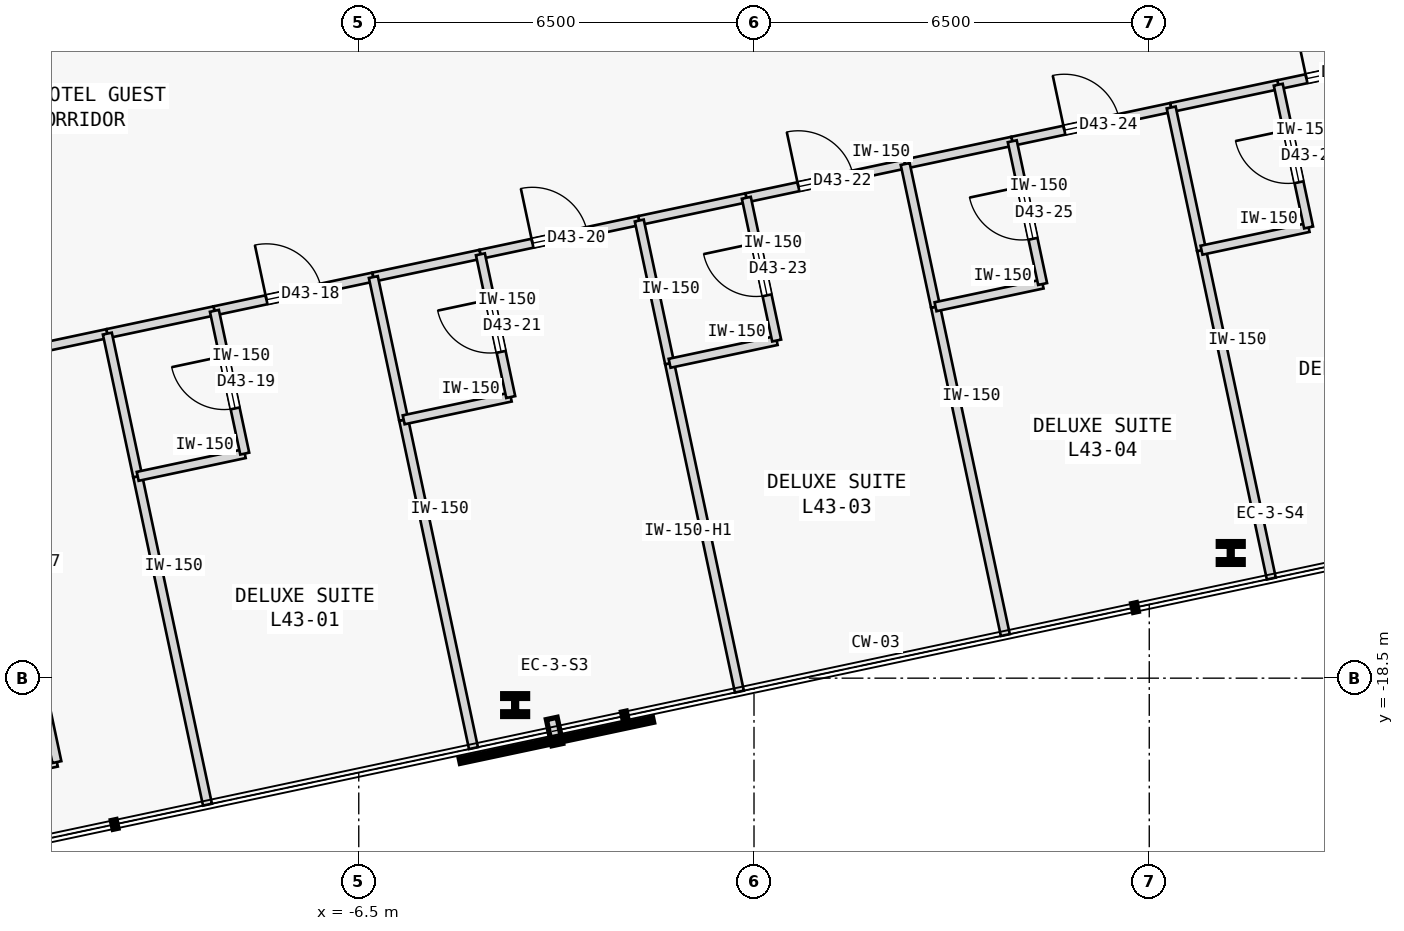
"""IFC4 building model, lengths in metres.
Left out: names, types, materials, properties, quantities, classifications, styles, units other than length and angle.
Written with IfcOpenShell. Run it as: python <this file> out.ifc"""

import sys

from ifc_helpers import new_model, si_unit, direction, frame, frame_2d, origin, origin_2d, place, context, subcontext, project, spatial, rectangle, i_section, extrude, element, fill, save


model = new_model("IFC4")
c1 = context("Model", 3, precision=1e-05, world=origin(), true_north=direction((0.0, 1.0)))
c2 = subcontext(c1, "Body", "Model", "MODEL_VIEW")
j1 = project(units=[si_unit("LENGTHUNIT", "METRE"), si_unit("PLANEANGLEUNIT", "RADIAN")], contexts=[c1])
p1 = place(None, origin())
s1 = spatial("IfcSite", under=j1, at=p1, CompositionType="ELEMENT")
p2 = place(p1, origin())
s2 = spatial("IfcBuilding", under=s1, at=p2, CompositionType="ELEMENT")
p3 = place(p2, frame((0.0, 0.0, 168.4)))
s3 = spatial("IfcBuildingStorey", under=s2, at=p3, CompositionType="ELEMENT", Elevation=168.4)
for number, where, z_axis, x_axis in (
    (1, (-3.928, -18.943, 0.0), (0.0, 0.0, 1.0), (1.0, 0.0, 0.0)),
    (2, (7.84, -16.441, 0.0), (0.0, 0.0, 1.0), (1.0, 0.0, 0.0)),
):
    element("IfcColumn", number, at=place(p3, frame(where, z_axis=z_axis, x_axis=x_axis)), inside=s3, PredefinedType="COLUMN", context=c2, shape_type="SweptSolid", body=[
        extrude(i_section(OverallWidth=0.409, OverallDepth=0.374, WebThickness=0.048, FlangeThickness=0.077, FilletRadius=0.015, at=origin_2d()), origin(), (0.0, 0.0, 1.0), 3.4),
    ])
p4 = place(p3, frame((-13.274, -20.265, 0.0), z_axis=(0.0, 0.0, 1.0), x_axis=(0.978160192495, 0.207852442415, 0.0)))
e3 = element("IfcWall", 3, at=p4, inside=s3, PredefinedType="PARTITIONING", context=c2, shape_type="SweptSolid", body=[
    extrude(rectangle(XDim=1.85, YDim=0.15, at=frame_2d((0.925, 0.0))), origin(), (0.0, 0.0, 1.0), 3.175),
])
p5 = place(p3, frame((-11.465, -19.88, 0.0), z_axis=(0.0, 0.0, 1.0), x_axis=(-0.207916109912, 0.978146661416, 0.0)))
e4 = element("IfcWall", 4, at=p5, inside=s3, PredefinedType="PARTITIONING", context=c2, shape_type="SweptSolid", body=[
    extrude(rectangle(XDim=6.72, YDim=0.15, at=frame_2d((3.36, 0.0))), origin(), (0.0, 0.0, 1.0), 3.175),
])
p6 = place(p5, frame((2.9, 0.0, 0.0)))
e5 = element("IfcOpeningElement", 5, at=p6, cuts=e4, PredefinedType="OPENING", context=c2, shape_type="SweptSolid", body=[
    extrude(rectangle(XDim=0.92, YDim=2.15, at=frame_2d((0.46, 1.075))), frame((0.0, 0.085, 0.0), z_axis=(0.0, -1.0, 0.0), x_axis=(1.0, 0.0, 0.0)), (0.0, 0.0, 1.0), 0.17),
])
p7 = place(p3, frame((-12.862, -13.307, 0.0), z_axis=(0.0, 0.0, 1.0), x_axis=(0.978150947903, 0.207895943, 0.0)))
e6 = element("IfcWall", 6, at=p7, inside=s3, PredefinedType="PARTITIONING", context=c2, shape_type="SweptSolid", body=[
    extrude(rectangle(XDim=2.277, YDim=0.15, at=frame_2d((1.139, 0.0))), origin(), (0.0, 0.0, 1.0), 3.175),
])
p8 = place(p3, frame((-8.874, -12.459, 0.0), z_axis=(0.0, 0.0, 1.0), x_axis=(0.978136784457, 0.207962570894, 0.0)))
e7 = element("IfcWall", 7, at=p8, inside=s3, PredefinedType="PARTITIONING", context=c2, shape_type="SweptSolid", body=[
    extrude(rectangle(XDim=2.672, YDim=0.15, at=frame_2d((1.336, 0.0))), origin(), (0.0, 0.0, 1.0), 3.175),
])
p9 = place(p8, frame((0.876, 0.0, 0.0)))
e8 = element("IfcOpeningElement", 8, at=p9, cuts=e7, PredefinedType="OPENING", context=c2, shape_type="SweptSolid", body=[
    extrude(rectangle(XDim=0.92, YDim=2.15, at=frame_2d((0.46, 1.075))), frame((0.0, 0.085, 0.0), z_axis=(0.0, -1.0, 0.0), x_axis=(1.0, 0.0, 0.0)), (0.0, 0.0, 1.0), 0.17),
])
p10 = place(p3, frame((-10.635, -12.834, 0.0), z_axis=(0.0, 0.0, 1.0), x_axis=(0.978146440129, 0.207917150959, 0.0)))
e9 = element("IfcWall", 9, at=p10, inside=s3, PredefinedType="PARTITIONING", context=c2, shape_type="SweptSolid", body=[
    extrude(rectangle(XDim=1.8, YDim=0.15, at=frame_2d((0.9, 0.0))), origin(), (0.0, 0.0, 1.0), 3.175),
])
p11 = place(p3, frame((-4.5, -11.53, 0.0), z_axis=(0.0, 0.0, 1.0), x_axis=(0.978139565144, 0.207949491702, 0.0)))
e10 = element("IfcWall", 10, at=p11, inside=s3, PredefinedType="PARTITIONING", context=c2, shape_type="SweptSolid", body=[
    extrude(rectangle(XDim=2.671, YDim=0.15, at=frame_2d((1.335, 0.0))), origin(), (0.0, 0.0, 1.0), 3.175),
])
p12 = place(p11, frame((0.875, 0.0, 0.0)))
e11 = element("IfcOpeningElement", 11, at=p12, cuts=e10, PredefinedType="OPENING", context=c2, shape_type="SweptSolid", body=[
    extrude(rectangle(XDim=0.92, YDim=2.15, at=frame_2d((0.46, 1.075))), frame((0.0, 0.085, 0.0), z_axis=(0.0, -1.0, 0.0), x_axis=(1.0, 0.0, 0.0)), (0.0, 0.0, 1.0), 0.17),
])
p13 = place(p3, frame((-6.26, -11.904, 0.0), z_axis=(0.0, 0.0, 1.0), x_axis=(0.978174015353, 0.207787380965, 0.0)))
e12 = element("IfcWall", 12, at=p13, inside=s3, PredefinedType="PARTITIONING", context=c2, shape_type="SweptSolid", body=[
    extrude(rectangle(XDim=1.8, YDim=0.15, at=frame_2d((0.9, 0.0))), origin(), (0.0, 0.0, 1.0), 3.175),
])
p14 = place(p3, frame((-0.126, -10.6, 0.0), z_axis=(0.0, 0.0, 1.0), x_axis=(0.978158153975, 0.207862035524, 0.0)))
e13 = element("IfcWall", 13, at=p14, inside=s3, PredefinedType="PARTITIONING", context=c2, shape_type="SweptSolid", body=[
    extrude(rectangle(XDim=2.671, YDim=0.15, at=frame_2d((1.335, 0.0))), origin(), (0.0, 0.0, 1.0), 3.175),
])
p15 = place(p14, frame((0.875, 0.0, 0.0)))
e14 = element("IfcOpeningElement", 14, at=p15, cuts=e13, PredefinedType="OPENING", context=c2, shape_type="SweptSolid", body=[
    extrude(rectangle(XDim=0.92, YDim=2.15, at=frame_2d((0.46, 1.075))), frame((0.0, 0.085, 0.0), z_axis=(0.0, -1.0, 0.0), x_axis=(1.0, 0.0, 0.0)), (0.0, 0.0, 1.0), 0.17),
])
p16 = place(p3, frame((-1.887, -10.974, 0.0), z_axis=(0.0, 0.0, 1.0), x_axis=(0.978146440129, 0.207917150959, 0.0)))
e15 = element("IfcWall", 15, at=p16, inside=s3, PredefinedType="PARTITIONING", context=c2, shape_type="SweptSolid", body=[
    extrude(rectangle(XDim=1.8, YDim=0.15, at=frame_2d((0.9, 0.0))), origin(), (0.0, 0.0, 1.0), 3.175),
])
p17 = place(p3, frame((4.247, -9.67, 0.0), z_axis=(0.0, 0.0, 1.0), x_axis=(0.978155367406, 0.207875148141, 0.0)))
e16 = element("IfcWall", 16, at=p17, inside=s3, PredefinedType="PARTITIONING", context=c2, shape_type="SweptSolid", body=[
    extrude(rectangle(XDim=2.672, YDim=0.15, at=frame_2d((1.336, 0.0))), origin(), (0.0, 0.0, 1.0), 3.175),
])
p18 = place(p17, frame((0.876, 0.0, 0.0)))
e17 = element("IfcOpeningElement", 17, at=p18, cuts=e16, PredefinedType="OPENING", context=c2, shape_type="SweptSolid", body=[
    extrude(rectangle(XDim=0.92, YDim=2.15, at=frame_2d((0.46, 1.075))), frame((0.0, 0.085, 0.0), z_axis=(0.0, -1.0, 0.0), x_axis=(1.0, 0.0, 0.0)), (0.0, 0.0, 1.0), 0.17),
])
p19 = place(p3, frame((2.486, -10.045, 0.0), z_axis=(0.0, 0.0, 1.0), x_axis=(0.978118849246, 0.208046909975, 0.0)))
e18 = element("IfcWall", 18, at=p19, inside=s3, PredefinedType="PARTITIONING", context=c2, shape_type="SweptSolid", body=[
    extrude(rectangle(XDim=1.8, YDim=0.15, at=frame_2d((0.9, 0.0))), origin(), (0.0, 0.0, 1.0), 3.175),
])
p20 = place(p3, frame((8.621, -8.741, 0.0), z_axis=(0.0, 0.0, 1.0), x_axis=(0.978139565144, 0.207949491702, 0.0)))
e19 = element("IfcWall", 19, at=p20, inside=s3, PredefinedType="PARTITIONING", context=c2, shape_type="SweptSolid", body=[
    extrude(rectangle(XDim=2.671, YDim=0.15, at=frame_2d((1.335, 0.0))), origin(), (0.0, 0.0, 1.0), 3.175),
])
p21 = place(p20, frame((0.475, 0.0, 0.0)))
e20 = element("IfcOpeningElement", 20, at=p21, cuts=e19, PredefinedType="OPENING", context=c2, shape_type="SweptSolid", body=[
    extrude(rectangle(XDim=0.92, YDim=2.15, at=frame_2d((0.46, 1.075))), frame((0.0, 0.085, 0.0), z_axis=(0.0, -1.0, 0.0), x_axis=(1.0, 0.0, 0.0)), (0.0, 0.0, 1.0), 0.17),
])
p22 = place(p3, frame((6.861, -9.115, 0.0), z_axis=(0.0, 0.0, 1.0), x_axis=(0.978146440129, 0.207917150959, 0.0)))
e21 = element("IfcWall", 21, at=p22, inside=s3, PredefinedType="PARTITIONING", context=c2, shape_type="SweptSolid", body=[
    extrude(rectangle(XDim=1.8, YDim=0.15, at=frame_2d((0.9, 0.0))), origin(), (0.0, 0.0, 1.0), 3.175),
])
p23 = place(p3, frame((-8.988, -20.581, 0.0), z_axis=(0.0, 0.0, 1.0), x_axis=(-0.20791588359, 0.978146709523, 0.0)))
e22 = element("IfcWall", 22, at=p23, inside=s3, PredefinedType="PARTITIONING", context=c2, shape_type="SweptSolid", body=[
    extrude(rectangle(XDim=5.52, YDim=0.15, at=frame_2d((2.76, 0.0))), origin(), (0.0, 0.0, 1.0), 3.175),
])
p24 = place(p3, frame((-10.135, -15.181, 0.0), z_axis=(0.0, 0.0, 1.0), x_axis=(-0.207937840262, 0.978142042133, 0.0)))
e23 = element("IfcWall", 23, at=p24, inside=s3, PredefinedType="PARTITIONING", context=c2, shape_type="SweptSolid", body=[
    extrude(rectangle(XDim=2.4, YDim=0.15, at=frame_2d((1.2, 0.0))), origin(), (0.0, 0.0, 1.0), 3.175),
])
p25 = place(p3, frame((-10.135, -15.181, 0.0), z_axis=(0.0, 0.0, 1.0), x_axis=(0.978140575842, 0.207944737591, 0.0)))
e24 = element("IfcWall", 24, at=p25, inside=s3, PredefinedType="PARTITIONING", context=c2, shape_type="SweptSolid", body=[
    extrude(rectangle(XDim=1.8, YDim=0.15, at=frame_2d((0.9, 0.0))), origin(), (0.0, 0.0, 1.0), 3.175),
])
p26 = place(p3, frame((-8.375, -14.807, 0.0), z_axis=(0.0, 0.0, 1.0), x_axis=(-0.207840504985, 0.978162729042, 0.0)))
e25 = element("IfcWall", 25, at=p26, inside=s3, PredefinedType="PARTITIONING", context=c2, shape_type="SweptSolid", body=[
    extrude(rectangle(XDim=2.4, YDim=0.15, at=frame_2d((1.2, 0.0))), origin(), (0.0, 0.0, 1.0), 3.175),
])
p27 = place(p26, frame((0.76, 0.0, 0.0)))
e26 = element("IfcOpeningElement", 26, at=p27, cuts=e25, PredefinedType="OPENING", context=c2, shape_type="SweptSolid", body=[
    extrude(rectangle(XDim=0.88, YDim=2.15, at=frame_2d((0.44, 1.075))), frame((0.0, 0.085, 0.0), z_axis=(0.0, -1.0, 0.0), x_axis=(1.0, 0.0, 0.0)), (0.0, 0.0, 1.0), 0.17),
])
p28 = place(p3, frame((-4.614, -19.651, 0.0), z_axis=(0.0, 0.0, 1.0), x_axis=(-0.20791588359, 0.978146709523, 0.0)))
e27 = element("IfcWall", 27, at=p28, inside=s3, PredefinedType="PARTITIONING", context=c2, shape_type="SweptSolid", body=[
    extrude(rectangle(XDim=5.52, YDim=0.15, at=frame_2d((2.76, 0.0))), origin(), (0.0, 0.0, 1.0), 3.175),
])
p29 = place(p3, frame((-5.761, -14.251, 0.0), z_axis=(0.0, 0.0, 1.0), x_axis=(-0.207917150959, 0.978146440129, 0.0)))
e28 = element("IfcWall", 28, at=p29, inside=s3, PredefinedType="PARTITIONING", context=c2, shape_type="SweptSolid", body=[
    extrude(rectangle(XDim=2.4, YDim=0.15, at=frame_2d((1.2, 0.0))), origin(), (0.0, 0.0, 1.0), 3.175),
])
p30 = place(p3, frame((-5.761, -14.251, 0.0), z_axis=(0.0, 0.0, 1.0), x_axis=(0.978146440129, 0.207917150959, 0.0)))
e29 = element("IfcWall", 29, at=p30, inside=s3, PredefinedType="PARTITIONING", context=c2, shape_type="SweptSolid", body=[
    extrude(rectangle(XDim=1.8, YDim=0.15, at=frame_2d((0.9, 0.0))), origin(), (0.0, 0.0, 1.0), 3.175),
])
p31 = place(p3, frame((-4.0, -13.877, 0.0), z_axis=(0.0, 0.0, 1.0), x_axis=(-0.207937840262, 0.978142042133, 0.0)))
e30 = element("IfcWall", 30, at=p31, inside=s3, PredefinedType="PARTITIONING", context=c2, shape_type="SweptSolid", body=[
    extrude(rectangle(XDim=2.4, YDim=0.15, at=frame_2d((1.2, 0.0))), origin(), (0.0, 0.0, 1.0), 3.175),
])
p32 = place(p31, frame((0.76, 0.0, 0.0)))
e31 = element("IfcOpeningElement", 31, at=p32, cuts=e30, PredefinedType="OPENING", context=c2, shape_type="SweptSolid", body=[
    extrude(rectangle(XDim=0.88, YDim=2.15, at=frame_2d((0.44, 1.075))), frame((0.0, 0.085, 0.0), z_axis=(0.0, -1.0, 0.0), x_axis=(1.0, 0.0, 0.0)), (0.0, 0.0, 1.0), 0.17),
])
p33 = place(p3, frame((-0.24, -18.721, 0.0), z_axis=(0.0, 0.0, 1.0), x_axis=(-0.20792487872, 0.978144797466, 0.0)))
e32 = element("IfcWall", 32, at=p33, inside=s3, PredefinedType="PARTITIONING", context=c2, shape_type="SweptSolid", body=[
    extrude(rectangle(XDim=5.52, YDim=0.15, at=frame_2d((2.76, 0.0))), origin(), (0.0, 0.0, 1.0), 2.725),
])
p34 = place(p3, frame((-1.388, -13.322, 0.0), z_axis=(0.0, 0.0, 1.0), x_axis=(-0.207917150959, 0.978146440129, 0.0)))
e33 = element("IfcWall", 33, at=p34, inside=s3, PredefinedType="PARTITIONING", context=c2, shape_type="SweptSolid", body=[
    extrude(rectangle(XDim=2.4, YDim=0.15, at=frame_2d((1.2, 0.0))), origin(), (0.0, 0.0, 1.0), 3.175),
])
p35 = place(p3, frame((-1.388, -13.322, 0.0), z_axis=(0.0, 0.0, 1.0), x_axis=(0.978118849246, 0.208046909975, 0.0)))
e34 = element("IfcWall", 34, at=p35, inside=s3, PredefinedType="PARTITIONING", context=c2, shape_type="SweptSolid", body=[
    extrude(rectangle(XDim=1.8, YDim=0.15, at=frame_2d((0.9, 0.0))), origin(), (0.0, 0.0, 1.0), 3.175),
])
p36 = place(p3, frame((0.373, -12.948, 0.0), z_axis=(0.0, 0.0, 1.0), x_axis=(-0.207937840262, 0.978142042133, 0.0)))
e35 = element("IfcWall", 35, at=p36, inside=s3, PredefinedType="PARTITIONING", context=c2, shape_type="SweptSolid", body=[
    extrude(rectangle(XDim=2.4, YDim=0.15, at=frame_2d((1.2, 0.0))), origin(), (0.0, 0.0, 1.0), 3.175),
])
p37 = place(p36, frame((0.76, 0.0, 0.0)))
e36 = element("IfcOpeningElement", 36, at=p37, cuts=e35, PredefinedType="OPENING", context=c2, shape_type="SweptSolid", body=[
    extrude(rectangle(XDim=0.88, YDim=2.15, at=frame_2d((0.44, 1.075))), frame((0.0, 0.085, 0.0), z_axis=(0.0, -1.0, 0.0), x_axis=(1.0, 0.0, 0.0)), (0.0, 0.0, 1.0), 0.17),
])
p38 = place(p3, frame((4.133, -17.792, 0.0), z_axis=(0.0, 0.0, 1.0), x_axis=(-0.20791588359, 0.978146709523, 0.0)))
e37 = element("IfcWall", 37, at=p38, inside=s3, PredefinedType="PARTITIONING", context=c2, shape_type="SweptSolid", body=[
    extrude(rectangle(XDim=5.52, YDim=0.15, at=frame_2d((2.76, 0.0))), origin(), (0.0, 0.0, 1.0), 3.175),
])
p39 = place(p3, frame((2.985, -12.392, 0.0), z_axis=(0.0, 0.0, 1.0), x_axis=(-0.207937840262, 0.978142042133, 0.0)))
e38 = element("IfcWall", 38, at=p39, inside=s3, PredefinedType="PARTITIONING", context=c2, shape_type="SweptSolid", body=[
    extrude(rectangle(XDim=2.4, YDim=0.15, at=frame_2d((1.2, 0.0))), origin(), (0.0, 0.0, 1.0), 3.175),
])
p40 = place(p3, frame((2.985, -12.392, 0.0), z_axis=(0.0, 0.0, 1.0), x_axis=(0.978146440129, 0.207917150959, 0.0)))
e39 = element("IfcWall", 39, at=p40, inside=s3, PredefinedType="PARTITIONING", context=c2, shape_type="SweptSolid", body=[
    extrude(rectangle(XDim=1.8, YDim=0.15, at=frame_2d((0.9, 0.0))), origin(), (0.0, 0.0, 1.0), 3.175),
])
p41 = place(p3, frame((4.746, -12.018, 0.0), z_axis=(0.0, 0.0, 1.0), x_axis=(-0.207917150959, 0.978146440129, 0.0)))
e40 = element("IfcWall", 40, at=p41, inside=s3, PredefinedType="PARTITIONING", context=c2, shape_type="SweptSolid", body=[
    extrude(rectangle(XDim=2.4, YDim=0.15, at=frame_2d((1.2, 0.0))), origin(), (0.0, 0.0, 1.0), 3.175),
])
p42 = place(p41, frame((0.76, 0.0, 0.0)))
e41 = element("IfcOpeningElement", 41, at=p42, cuts=e40, PredefinedType="OPENING", context=c2, shape_type="SweptSolid", body=[
    extrude(rectangle(XDim=0.88, YDim=2.15, at=frame_2d((0.44, 1.075))), frame((0.0, 0.085, 0.0), z_axis=(0.0, -1.0, 0.0), x_axis=(1.0, 0.0, 0.0)), (0.0, 0.0, 1.0), 0.17),
])
p43 = place(p3, frame((8.507, -16.862, 0.0), z_axis=(0.0, 0.0, 1.0), x_axis=(-0.20791588359, 0.978146709523, 0.0)))
e42 = element("IfcWall", 42, at=p43, inside=s3, PredefinedType="PARTITIONING", context=c2, shape_type="SweptSolid", body=[
    extrude(rectangle(XDim=5.52, YDim=0.15, at=frame_2d((2.76, 0.0))), origin(), (0.0, 0.0, 1.0), 3.175),
])
p44 = place(p3, frame((7.36, -11.462, 0.0), z_axis=(0.0, 0.0, 1.0), x_axis=(-0.207937840262, 0.978142042133, 0.0)))
e43 = element("IfcWall", 43, at=p44, inside=s3, PredefinedType="PARTITIONING", context=c2, shape_type="SweptSolid", body=[
    extrude(rectangle(XDim=2.4, YDim=0.15, at=frame_2d((1.2, 0.0))), origin(), (0.0, 0.0, 1.0), 3.175),
])
p45 = place(p3, frame((7.36, -11.462, 0.0), z_axis=(0.0, 0.0, 1.0), x_axis=(0.978174015353, 0.207787380965, 0.0)))
e44 = element("IfcWall", 44, at=p45, inside=s3, PredefinedType="PARTITIONING", context=c2, shape_type="SweptSolid", body=[
    extrude(rectangle(XDim=1.8, YDim=0.15, at=frame_2d((0.9, 0.0))), origin(), (0.0, 0.0, 1.0), 3.175),
])
p46 = place(p3, frame((9.12, -11.088, 0.0), z_axis=(0.0, 0.0, 1.0), x_axis=(-0.207917150959, 0.978146440129, 0.0)))
e45 = element("IfcWall", 45, at=p46, inside=s3, PredefinedType="PARTITIONING", context=c2, shape_type="SweptSolid", body=[
    extrude(rectangle(XDim=2.4, YDim=0.15, at=frame_2d((1.2, 0.0))), origin(), (0.0, 0.0, 1.0), 3.175),
])
p47 = place(p46, frame((0.76, 0.0, 0.0)))
e46 = element("IfcOpeningElement", 46, at=p47, cuts=e45, PredefinedType="OPENING", context=c2, shape_type="SweptSolid", body=[
    extrude(rectangle(XDim=0.88, YDim=2.15, at=frame_2d((0.44, 1.075))), frame((0.0, 0.085, 0.0), z_axis=(0.0, -1.0, 0.0), x_axis=(1.0, 0.0, 0.0)), (0.0, 0.0, 1.0), 0.17),
])
p48 = place(p9, origin())
e47 = element("IfcDoor", 47, at=p48, inside=s3, OperationType="SINGLE_SWING_LEFT", PredefinedType="DOOR", context=c2, shape_type="SweptSolid", body=[
    extrude(rectangle(XDim=0.92, YDim=2.15, at=frame_2d((0.46, 1.075))), frame((0.0, 0.025, 0.0), z_axis=(0.0, -1.0, 0.0), x_axis=(1.0, 0.0, 0.0)), (0.0, 0.0, 1.0), 0.05),
])
fill(e8, e47)
p49 = place(p27, origin())
e48 = element("IfcDoor", 48, at=p49, inside=s3, OperationType="SINGLE_SWING_RIGHT", PredefinedType="DOOR", context=c2, shape_type="SweptSolid", body=[
    extrude(rectangle(XDim=0.88, YDim=2.15, at=frame_2d((0.44, 1.075))), frame((0.0, 0.025, 0.0), z_axis=(0.0, -1.0, 0.0), x_axis=(1.0, 0.0, 0.0)), (0.0, 0.0, 1.0), 0.05),
])
fill(e26, e48)
p50 = place(p12, origin())
e49 = element("IfcDoor", 49, at=p50, inside=s3, OperationType="SINGLE_SWING_LEFT", PredefinedType="DOOR", context=c2, shape_type="SweptSolid", body=[
    extrude(rectangle(XDim=0.92, YDim=2.15, at=frame_2d((0.46, 1.075))), frame((0.0, 0.025, 0.0), z_axis=(0.0, -1.0, 0.0), x_axis=(1.0, 0.0, 0.0)), (0.0, 0.0, 1.0), 0.05),
])
fill(e11, e49)
p51 = place(p32, origin())
e50 = element("IfcDoor", 50, at=p51, inside=s3, OperationType="SINGLE_SWING_RIGHT", PredefinedType="DOOR", context=c2, shape_type="SweptSolid", body=[
    extrude(rectangle(XDim=0.88, YDim=2.15, at=frame_2d((0.44, 1.075))), frame((0.0, 0.025, 0.0), z_axis=(0.0, -1.0, 0.0), x_axis=(1.0, 0.0, 0.0)), (0.0, 0.0, 1.0), 0.05),
])
fill(e31, e50)
p52 = place(p15, origin())
e51 = element("IfcDoor", 51, at=p52, inside=s3, OperationType="SINGLE_SWING_LEFT", PredefinedType="DOOR", context=c2, shape_type="SweptSolid", body=[
    extrude(rectangle(XDim=0.92, YDim=2.15, at=frame_2d((0.46, 1.075))), frame((0.0, 0.025, 0.0), z_axis=(0.0, -1.0, 0.0), x_axis=(1.0, 0.0, 0.0)), (0.0, 0.0, 1.0), 0.05),
])
fill(e14, e51)
p53 = place(p37, origin())
e52 = element("IfcDoor", 52, at=p53, inside=s3, OperationType="SINGLE_SWING_RIGHT", PredefinedType="DOOR", context=c2, shape_type="SweptSolid", body=[
    extrude(rectangle(XDim=0.88, YDim=2.15, at=frame_2d((0.44, 1.075))), frame((0.0, 0.025, 0.0), z_axis=(0.0, -1.0, 0.0), x_axis=(1.0, 0.0, 0.0)), (0.0, 0.0, 1.0), 0.05),
])
fill(e36, e52)
p54 = place(p18, origin())
e53 = element("IfcDoor", 53, at=p54, inside=s3, OperationType="SINGLE_SWING_LEFT", PredefinedType="DOOR", context=c2, shape_type="SweptSolid", body=[
    extrude(rectangle(XDim=0.92, YDim=2.15, at=frame_2d((0.46, 1.075))), frame((0.0, 0.025, 0.0), z_axis=(0.0, -1.0, 0.0), x_axis=(1.0, 0.0, 0.0)), (0.0, 0.0, 1.0), 0.05),
])
fill(e17, e53)
p55 = place(p42, origin())
e54 = element("IfcDoor", 54, at=p55, inside=s3, OperationType="SINGLE_SWING_RIGHT", PredefinedType="DOOR", context=c2, shape_type="SweptSolid", body=[
    extrude(rectangle(XDim=0.88, YDim=2.15, at=frame_2d((0.44, 1.075))), frame((0.0, 0.025, 0.0), z_axis=(0.0, -1.0, 0.0), x_axis=(1.0, 0.0, 0.0)), (0.0, 0.0, 1.0), 0.05),
])
fill(e41, e54)
p56 = place(p21, origin())
e55 = element("IfcDoor", 55, at=p56, inside=s3, OperationType="SINGLE_SWING_LEFT", PredefinedType="DOOR", context=c2, shape_type="SweptSolid", body=[
    extrude(rectangle(XDim=0.92, YDim=2.15, at=frame_2d((0.46, 1.075))), frame((0.0, 0.025, 0.0), z_axis=(0.0, -1.0, 0.0), x_axis=(1.0, 0.0, 0.0)), (0.0, 0.0, 1.0), 0.05),
])
fill(e20, e55)
p57 = place(p47, origin())
e56 = element("IfcDoor", 56, at=p57, inside=s3, OperationType="SINGLE_SWING_RIGHT", PredefinedType="DOOR", context=c2, shape_type="SweptSolid", body=[
    extrude(rectangle(XDim=0.88, YDim=2.15, at=frame_2d((0.44, 1.075))), frame((0.0, 0.025, 0.0), z_axis=(0.0, -1.0, 0.0), x_axis=(1.0, 0.0, 0.0)), (0.0, 0.0, 1.0), 0.05),
])
fill(e46, e56)
save(model, sys.argv[1])
